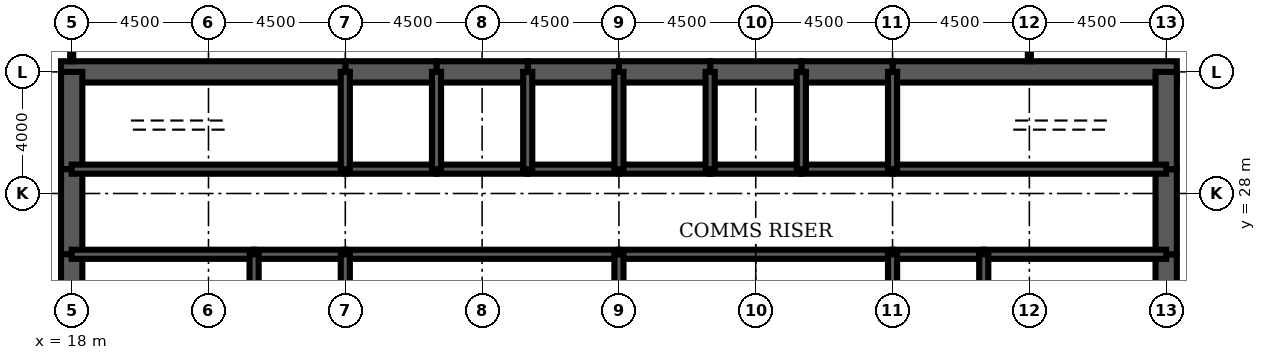
"""IFC4 building model, lengths in metres.
Left out: names, types, materials, properties, quantities, classifications, styles, units other than length and angle.
Written with IfcOpenShell. Run it as: python <this file> out.ifc"""

import sys

from ifc_helpers import new_model, si_unit, direction, frame, frame_2d, origin, place, context, subcontext, project, spatial, rectangle, extrude, element, fill, save


model = new_model("IFC4")
c1 = context("Model", 3, precision=1e-05, world=origin(), true_north=direction((0.0, 1.0)))
c2 = subcontext(c1, "Body", "Model", "MODEL_VIEW")
j1 = project(units=[si_unit("LENGTHUNIT", "METRE"), si_unit("PLANEANGLEUNIT", "RADIAN")], contexts=[c1])
p1 = place(None, origin())
s1 = spatial("IfcSite", under=j1, at=p1, CompositionType="ELEMENT")
p2 = place(p1, origin())
s2 = spatial("IfcBuilding", under=s1, at=p2, CompositionType="ELEMENT")
p3 = place(p2, frame((0.0, 0.0, 296.3)))
s3 = spatial("IfcBuildingStorey", under=s2, at=p3, CompositionType="ELEMENT", Elevation=296.3)
p4 = place(p3, frame((54.35, 32.0, 0.0), z_axis=(0.0, 0.0, 1.0), x_axis=(-1.0, 0.0, 0.0)))
e1 = element("IfcWall", 1, at=p4, inside=s3, PredefinedType="SHEAR", context=c2, shape_type="SweptSolid", body=[
    extrude(rectangle(XDim=9.35, YDim=0.7, at=frame_2d((4.675, 0.0))), origin(), (0.0, 0.0, 1.0), 4.2),
])
for number, where, z_axis, x_axis in (
    (2, (45.0, 32.0, 0.0), (0.0, 0.0, 1.0), (-1.0, 0.0, 0.0)),
    (3, (42.0, 32.0, 0.0), (0.0, 0.0, 1.0), (-1.0, 0.0, 0.0)),
    (4, (39.0, 32.0, 0.0), (0.0, 0.0, 1.0), (-1.0, 0.0, 0.0)),
    (5, (36.0, 32.0, 0.0), (0.0, 0.0, 1.0), (-1.0, 0.0, 0.0)),
    (6, (33.0, 32.0, 0.0), (0.0, 0.0, 1.0), (-1.0, 0.0, 0.0)),
    (7, (30.0, 32.0, 0.0), (0.0, 0.0, 1.0), (-1.0, 0.0, 0.0)),
):
    element("IfcWall", number, at=place(p3, frame(where, z_axis=z_axis, x_axis=x_axis)), inside=s3, PredefinedType="SHEAR", context=c2, shape_type="SweptSolid", body=[
        extrude(rectangle(XDim=3.0, YDim=0.7, at=frame_2d((1.5, 0.0))), origin(), (0.0, 0.0, 1.0), 4.2),
    ])
p5 = place(p3, frame((27.0, 32.0, 0.0), z_axis=(0.0, 0.0, 1.0), x_axis=(-1.0, 0.0, 0.0)))
e8 = element("IfcWall", 8, at=p5, inside=s3, PredefinedType="SHEAR", context=c2, shape_type="SweptSolid", body=[
    extrude(rectangle(XDim=9.35, YDim=0.7, at=frame_2d((4.675, 0.0))), origin(), (0.0, 0.0, 1.0), 4.2),
])
p6 = place(p3, frame((18.0, 32.0, 0.0), z_axis=(0.0, 0.0, 1.0), x_axis=(0.0, -1.0, 0.0)))
e9 = element("IfcWall", 9, at=p6, inside=s3, PredefinedType="SHEAR", context=c2, shape_type="SweptSolid", body=[
    extrude(rectangle(XDim=3.2, YDim=0.7, at=frame_2d((1.6, 0.0))), origin(), (0.0, 0.0, 1.0), 4.2),
])
p7 = place(p3, frame((18.0, 28.8, 0.0), z_axis=(0.0, 0.0, 1.0), x_axis=(0.0, -1.0, 0.0)))
e10 = element("IfcWall", 10, at=p7, inside=s3, PredefinedType="SHEAR", context=c2, shape_type="SweptSolid", body=[
    extrude(rectangle(XDim=2.8, YDim=0.7, at=frame_2d((1.4, 0.0))), origin(), (0.0, 0.0, 1.0), 4.2),
])
p8 = place(p7, frame((0.4, 0.0, 0.0)))
e11 = element("IfcOpeningElement", 11, at=p8, cuts=e10, PredefinedType="OPENING", context=c2, shape_type="SweptSolid", body=[
    extrude(rectangle(XDim=1.8, YDim=2.1, at=frame_2d((0.9, 1.05))), frame((0.0, 0.36, 0.0), z_axis=(0.0, -1.0, 0.0), x_axis=(1.0, 0.0, 0.0)), (0.0, 0.0, 1.0), 0.72),
])
for number, where, z_axis, x_axis in (
    (12, (18.0, 26.0, 0.0), (0.0, 0.0, 1.0), (0.0, -1.0, 0.0)),
    (13, (54.0, 22.0, 0.0), (0.0, 0.0, 1.0), (0.0, 1.0, 0.0)),
):
    element("IfcWall", number, at=place(p3, frame(where, z_axis=z_axis, x_axis=x_axis)), inside=s3, PredefinedType="SHEAR", context=c2, shape_type="SweptSolid", body=[
        extrude(rectangle(XDim=4.0, YDim=0.7, at=frame_2d((2.0, 0.0))), origin(), (0.0, 0.0, 1.0), 4.2),
    ])
p9 = place(p3, frame((54.0, 26.0, 0.0), z_axis=(0.0, 0.0, 1.0), x_axis=(0.0, 1.0, 0.0)))
e14 = element("IfcWall", 14, at=p9, inside=s3, PredefinedType="SHEAR", context=c2, shape_type="SweptSolid", body=[
    extrude(rectangle(XDim=2.8, YDim=0.7, at=frame_2d((1.4, 0.0))), origin(), (0.0, 0.0, 1.0), 4.2),
])
p10 = place(p9, frame((0.6, 0.0, 0.0)))
e15 = element("IfcOpeningElement", 15, at=p10, cuts=e14, PredefinedType="OPENING", context=c2, shape_type="SweptSolid", body=[
    extrude(rectangle(XDim=1.8, YDim=2.1, at=frame_2d((0.9, 1.05))), frame((0.0, 0.36, 0.0), z_axis=(0.0, -1.0, 0.0), x_axis=(1.0, 0.0, 0.0)), (0.0, 0.0, 1.0), 0.72),
])
p11 = place(p3, frame((54.0, 28.8, 0.0), z_axis=(0.0, 0.0, 1.0), x_axis=(0.0, 1.0, 0.0)))
e16 = element("IfcWall", 16, at=p11, inside=s3, PredefinedType="SHEAR", context=c2, shape_type="SweptSolid", body=[
    extrude(rectangle(XDim=3.2, YDim=0.7, at=frame_2d((1.6, 0.0))), origin(), (0.0, 0.0, 1.0), 4.2),
])
p12 = place(p3, frame((18.0, 28.8, 0.0), z_axis=(0.0, 0.0, 1.0), x_axis=(1.0, 0.0, 0.0)))
e17 = element("IfcWall", 17, at=p12, inside=s3, PredefinedType="SOLIDWALL", context=c2, shape_type="SweptSolid", body=[
    extrude(rectangle(XDim=9.0, YDim=0.3, at=frame_2d((4.5, 0.0))), origin(), (0.0, 0.0, 1.0), 4.2),
])
p13 = place(p12, frame((0.65, 0.0, 0.0)))
e18 = element("IfcOpeningElement", 18, at=p13, cuts=e17, PredefinedType="OPENING", context=c2, shape_type="SweptSolid", body=[
    extrude(rectangle(XDim=1.0, YDim=2.1, at=frame_2d((0.5, 1.05))), frame((0.0, 0.16, 0.0), z_axis=(0.0, -1.0, 0.0), x_axis=(1.0, 0.0, 0.0)), (0.0, 0.0, 1.0), 0.32),
])
p14 = place(p3, frame((27.0, 28.8, 0.0), z_axis=(0.0, 0.0, 1.0), x_axis=(1.0, 0.0, 0.0)))
e19 = element("IfcWall", 19, at=p14, inside=s3, PredefinedType="SOLIDWALL", context=c2, shape_type="SweptSolid", body=[
    extrude(rectangle(XDim=3.0, YDim=0.3, at=frame_2d((1.5, 0.0))), origin(), (0.0, 0.0, 1.0), 4.2),
])
p15 = place(p14, frame((0.95, 0.0, 0.0)))
e20 = element("IfcOpeningElement", 20, at=p15, cuts=e19, PredefinedType="OPENING", context=c2, shape_type="SweptSolid", body=[
    extrude(rectangle(XDim=1.1, YDim=2.2, at=frame_2d((0.55, 1.1))), frame((0.0, 0.16, 0.0), z_axis=(0.0, -1.0, 0.0), x_axis=(1.0, 0.0, 0.0)), (0.0, 0.0, 1.0), 0.32),
])
p16 = place(p3, frame((30.0, 28.8, 0.0), z_axis=(0.0, 0.0, 1.0), x_axis=(1.0, 0.0, 0.0)))
e21 = element("IfcWall", 21, at=p16, inside=s3, PredefinedType="SOLIDWALL", context=c2, shape_type="SweptSolid", body=[
    extrude(rectangle(XDim=3.0, YDim=0.3, at=frame_2d((1.5, 0.0))), origin(), (0.0, 0.0, 1.0), 4.2),
])
p17 = place(p16, frame((0.95, 0.0, 0.0)))
e22 = element("IfcOpeningElement", 22, at=p17, cuts=e21, PredefinedType="OPENING", context=c2, shape_type="SweptSolid", body=[
    extrude(rectangle(XDim=1.1, YDim=2.2, at=frame_2d((0.55, 1.1))), frame((0.0, 0.16, 0.0), z_axis=(0.0, -1.0, 0.0), x_axis=(1.0, 0.0, 0.0)), (0.0, 0.0, 1.0), 0.32),
])
p18 = place(p3, frame((33.0, 28.8, 0.0), z_axis=(0.0, 0.0, 1.0), x_axis=(1.0, 0.0, 0.0)))
e23 = element("IfcWall", 23, at=p18, inside=s3, PredefinedType="SOLIDWALL", context=c2, shape_type="SweptSolid", body=[
    extrude(rectangle(XDim=3.0, YDim=0.3, at=frame_2d((1.5, 0.0))), origin(), (0.0, 0.0, 1.0), 4.2),
])
p19 = place(p18, frame((0.95, 0.0, 0.0)))
e24 = element("IfcOpeningElement", 24, at=p19, cuts=e23, PredefinedType="OPENING", context=c2, shape_type="SweptSolid", body=[
    extrude(rectangle(XDim=1.1, YDim=2.2, at=frame_2d((0.55, 1.1))), frame((0.0, 0.16, 0.0), z_axis=(0.0, -1.0, 0.0), x_axis=(1.0, 0.0, 0.0)), (0.0, 0.0, 1.0), 0.32),
])
p20 = place(p3, frame((36.0, 28.8, 0.0), z_axis=(0.0, 0.0, 1.0), x_axis=(1.0, 0.0, 0.0)))
e25 = element("IfcWall", 25, at=p20, inside=s3, PredefinedType="SOLIDWALL", context=c2, shape_type="SweptSolid", body=[
    extrude(rectangle(XDim=3.0, YDim=0.3, at=frame_2d((1.5, 0.0))), origin(), (0.0, 0.0, 1.0), 4.2),
])
p21 = place(p20, frame((1.0, 0.0, 0.0)))
e26 = element("IfcOpeningElement", 26, at=p21, cuts=e25, PredefinedType="OPENING", context=c2, shape_type="SweptSolid", body=[
    extrude(rectangle(XDim=1.0, YDim=2.1, at=frame_2d((0.5, 1.05))), frame((0.0, 0.16, 0.0), z_axis=(0.0, -1.0, 0.0), x_axis=(1.0, 0.0, 0.0)), (0.0, 0.0, 1.0), 0.32),
])
p22 = place(p3, frame((39.0, 28.8, 0.0), z_axis=(0.0, 0.0, 1.0), x_axis=(1.0, 0.0, 0.0)))
e27 = element("IfcWall", 27, at=p22, inside=s3, PredefinedType="SOLIDWALL", context=c2, shape_type="SweptSolid", body=[
    extrude(rectangle(XDim=3.0, YDim=0.3, at=frame_2d((1.5, 0.0))), origin(), (0.0, 0.0, 1.0), 4.2),
])
p23 = place(p22, frame((1.0, 0.0, 0.0)))
e28 = element("IfcOpeningElement", 28, at=p23, cuts=e27, PredefinedType="OPENING", context=c2, shape_type="SweptSolid", body=[
    extrude(rectangle(XDim=1.0, YDim=2.1, at=frame_2d((0.5, 1.05))), frame((0.0, 0.16, 0.0), z_axis=(0.0, -1.0, 0.0), x_axis=(1.0, 0.0, 0.0)), (0.0, 0.0, 1.0), 0.32),
])
p24 = place(p3, frame((42.0, 28.8, 0.0), z_axis=(0.0, 0.0, 1.0), x_axis=(1.0, 0.0, 0.0)))
e29 = element("IfcWall", 29, at=p24, inside=s3, PredefinedType="SOLIDWALL", context=c2, shape_type="SweptSolid", body=[
    extrude(rectangle(XDim=3.0, YDim=0.3, at=frame_2d((1.5, 0.0))), origin(), (0.0, 0.0, 1.0), 4.2),
])
p25 = place(p24, frame((0.95, 0.0, 0.0)))
e30 = element("IfcOpeningElement", 30, at=p25, cuts=e29, PredefinedType="OPENING", context=c2, shape_type="SweptSolid", body=[
    extrude(rectangle(XDim=1.1, YDim=2.2, at=frame_2d((0.55, 1.1))), frame((0.0, 0.16, 0.0), z_axis=(0.0, -1.0, 0.0), x_axis=(1.0, 0.0, 0.0)), (0.0, 0.0, 1.0), 0.32),
])
p26 = place(p3, frame((45.0, 28.8, 0.0), z_axis=(0.0, 0.0, 1.0), x_axis=(1.0, 0.0, 0.0)))
e31 = element("IfcWall", 31, at=p26, inside=s3, PredefinedType="SOLIDWALL", context=c2, shape_type="SweptSolid", body=[
    extrude(rectangle(XDim=9.0, YDim=0.3, at=frame_2d((4.5, 0.0))), origin(), (0.0, 0.0, 1.0), 4.2),
])
p27 = place(p26, frame((7.35, 0.0, 0.0)))
e32 = element("IfcOpeningElement", 32, at=p27, cuts=e31, PredefinedType="OPENING", context=c2, shape_type="SweptSolid", body=[
    extrude(rectangle(XDim=1.0, YDim=2.1, at=frame_2d((0.5, 1.05))), frame((0.0, 0.16, 0.0), z_axis=(0.0, -1.0, 0.0), x_axis=(1.0, 0.0, 0.0)), (0.0, 0.0, 1.0), 0.32),
])
p28 = place(p3, frame((18.0, 26.0, 0.0), z_axis=(0.0, 0.0, 1.0), x_axis=(1.0, 0.0, 0.0)))
e33 = element("IfcWall", 33, at=p28, inside=s3, PredefinedType="SOLIDWALL", context=c2, shape_type="SweptSolid", body=[
    extrude(rectangle(XDim=6.0, YDim=0.3, at=frame_2d((3.0, 0.0))), origin(), (0.0, 0.0, 1.0), 4.2),
])
p29 = place(p3, frame((24.0, 26.0, 0.0), z_axis=(0.0, 0.0, 1.0), x_axis=(1.0, 0.0, 0.0)))
e34 = element("IfcWall", 34, at=p29, inside=s3, PredefinedType="SOLIDWALL", context=c2, shape_type="SweptSolid", body=[
    extrude(rectangle(XDim=3.0, YDim=0.3, at=frame_2d((1.5, 0.0))), origin(), (0.0, 0.0, 1.0), 4.2),
])
for number, where, z_axis, x_axis in (
    (35, (27.0, 26.0, 0.0), (0.0, 0.0, 1.0), (1.0, 0.0, 0.0)),
    (36, (36.0, 26.0, 0.0), (0.0, 0.0, 1.0), (1.0, 0.0, 0.0)),
):
    element("IfcWall", number, at=place(p3, frame(where, z_axis=z_axis, x_axis=x_axis)), inside=s3, PredefinedType="SOLIDWALL", context=c2, shape_type="SweptSolid", body=[
        extrude(rectangle(XDim=9.0, YDim=0.3, at=frame_2d((4.5, 0.0))), origin(), (0.0, 0.0, 1.0), 4.2),
    ])
p30 = place(p3, frame((45.0, 26.0, 0.0), z_axis=(0.0, 0.0, 1.0), x_axis=(1.0, 0.0, 0.0)))
e37 = element("IfcWall", 37, at=p30, inside=s3, PredefinedType="SOLIDWALL", context=c2, shape_type="SweptSolid", body=[
    extrude(rectangle(XDim=3.0, YDim=0.3, at=frame_2d((1.5, 0.0))), origin(), (0.0, 0.0, 1.0), 4.2),
])
p31 = place(p3, frame((48.0, 26.0, 0.0), z_axis=(0.0, 0.0, 1.0), x_axis=(1.0, 0.0, 0.0)))
e38 = element("IfcWall", 38, at=p31, inside=s3, PredefinedType="SOLIDWALL", context=c2, shape_type="SweptSolid", body=[
    extrude(rectangle(XDim=6.0, YDim=0.3, at=frame_2d((3.0, 0.0))), origin(), (0.0, 0.0, 1.0), 4.2),
])
for number, where, z_axis, x_axis in (
    (39, (27.0, 28.8, 0.0), (0.0, 0.0, 1.0), (0.0, 1.0, 0.0)),
    (40, (30.0, 28.8, 0.0), (0.0, 0.0, 1.0), (0.0, 1.0, 0.0)),
    (41, (33.0, 28.8, 0.0), (0.0, 0.0, 1.0), (0.0, 1.0, 0.0)),
    (42, (36.0, 28.8, 0.0), (0.0, 0.0, 1.0), (0.0, 1.0, 0.0)),
    (43, (39.0, 28.8, 0.0), (0.0, 0.0, 1.0), (0.0, 1.0, 0.0)),
    (44, (42.0, 28.8, 0.0), (0.0, 0.0, 1.0), (0.0, 1.0, 0.0)),
    (45, (45.0, 28.8, 0.0), (0.0, 0.0, 1.0), (0.0, 1.0, 0.0)),
):
    element("IfcWall", number, at=place(p3, frame(where, z_axis=z_axis, x_axis=x_axis)), inside=s3, PredefinedType="SOLIDWALL", context=c2, shape_type="SweptSolid", body=[
        extrude(rectangle(XDim=3.2, YDim=0.3, at=frame_2d((1.6, 0.0))), origin(), (0.0, 0.0, 1.0), 4.2),
    ])
for number, where, z_axis, x_axis in (
    (46, (24.0, 22.0, 0.0), (0.0, 0.0, 1.0), (0.0, 1.0, 0.0)),
    (47, (27.0, 22.0, 0.0), (0.0, 0.0, 1.0), (0.0, 1.0, 0.0)),
    (48, (36.0, 22.0, 0.0), (0.0, 0.0, 1.0), (0.0, 1.0, 0.0)),
    (49, (45.0, 22.0, 0.0), (0.0, 0.0, 1.0), (0.0, 1.0, 0.0)),
    (50, (48.0, 22.0, 0.0), (0.0, 0.0, 1.0), (0.0, 1.0, 0.0)),
):
    element("IfcWall", number, at=place(p3, frame(where, z_axis=z_axis, x_axis=x_axis)), inside=s3, PredefinedType="SOLIDWALL", context=c2, shape_type="SweptSolid", body=[
        extrude(rectangle(XDim=4.0, YDim=0.3, at=frame_2d((2.0, 0.0))), origin(), (0.0, 0.0, 1.0), 4.2),
    ])
p32 = place(p3, frame((38.5, 22.15, 0.0), z_axis=(0.0, 0.0, 1.0), x_axis=(0.0, 1.0, 0.0)))
e51 = element("IfcWall", 51, at=p32, inside=s3, PredefinedType="PARTITIONING", context=c2, shape_type="SweptSolid", body=[
    extrude(rectangle(XDim=3.7, YDim=0.15, at=frame_2d((1.85, 0.0))), origin(), (0.0, 0.0, 1.0), 3.0),
])
p33 = place(p32, frame((2.2, 0.0, 0.0)))
e52 = element("IfcOpeningElement", 52, at=p33, cuts=e51, PredefinedType="OPENING", context=c2, shape_type="SweptSolid", body=[
    extrude(rectangle(XDim=1.0, YDim=2.1, at=frame_2d((0.5, 1.05))), frame((0.0, 0.085, 0.0), z_axis=(0.0, -1.0, 0.0), x_axis=(1.0, 0.0, 0.0)), (0.0, 0.0, 1.0), 0.17),
])
for number, where, z_axis, x_axis in (
    (53, (19.925, 22.15, 0.0), (0.0, 0.0, 1.0), (0.0, 1.0, 0.0)),
    (54, (51.475, 22.15, 0.0), (0.0, 0.0, 1.0), (0.0, 1.0, 0.0)),
):
    element("IfcWall", number, at=place(p3, frame(where, z_axis=z_axis, x_axis=x_axis)), inside=s3, PredefinedType="PARTITIONING", context=c2, shape_type="SweptSolid", body=[
        extrude(rectangle(XDim=3.7, YDim=0.15, at=frame_2d((1.85, 0.0))), origin(), (0.0, 0.0, 1.0), 3.0),
    ])
p34 = place(p3, frame((23.7, 26.15, 0.0), z_axis=(0.0, 0.0, 1.0), x_axis=(0.0, 1.0, 0.0)))
e55 = element("IfcWall", 55, at=p34, inside=s3, PredefinedType="PARTITIONING", context=c2, shape_type="SweptSolid", body=[
    extrude(rectangle(XDim=2.5, YDim=0.15, at=frame_2d((1.25, 0.0))), origin(), (0.0, 0.0, 1.0), 3.0),
])
p35 = place(p34, frame((0.35, 0.0, 0.0)))
e56 = element("IfcOpeningElement", 56, at=p35, cuts=e55, PredefinedType="OPENING", context=c2, shape_type="SweptSolid", body=[
    extrude(rectangle(XDim=1.0, YDim=2.1, at=frame_2d((0.5, 1.05))), frame((0.0, 0.085, 0.0), z_axis=(0.0, -1.0, 0.0), x_axis=(1.0, 0.0, 0.0)), (0.0, 0.0, 1.0), 0.17),
])
p36 = place(p3, frame((18.0, 32.35, 0.0), z_axis=(0.0, 0.0, 1.0), x_axis=(0.0, 1.0, 0.0)))
e57 = element("IfcWall", 57, at=p36, inside=s3, PredefinedType="PARTITIONING", context=c2, shape_type="SweptSolid", body=[
    extrude(rectangle(XDim=4.2, YDim=0.1, at=frame_2d((2.1, 0.0))), origin(), (0.0, 0.0, 1.0), 3.0),
])
p37 = place(p36, frame((1.3, 0.0, 0.0)))
e58 = element("IfcOpeningElement", 58, at=p37, cuts=e57, PredefinedType="OPENING", context=c2, shape_type="SweptSolid", body=[
    extrude(rectangle(XDim=1.6, YDim=2.1, at=frame_2d((0.8, 1.05))), frame((0.0, 0.06, 0.0), z_axis=(0.0, -1.0, 0.0), x_axis=(1.0, 0.0, 0.0)), (0.0, 0.0, 1.0), 0.12),
])
p38 = place(p3, frame((49.5, 32.35, 0.0), z_axis=(0.0, 0.0, 1.0), x_axis=(0.0, 1.0, 0.0)))
e59 = element("IfcWall", 59, at=p38, inside=s3, PredefinedType="PARTITIONING", context=c2, shape_type="SweptSolid", body=[
    extrude(rectangle(XDim=5.2, YDim=0.1, at=frame_2d((2.6, 0.0))), origin(), (0.0, 0.0, 1.0), 3.0),
])
p39 = place(p38, frame((1.8, 0.0, 0.0)))
e60 = element("IfcOpeningElement", 60, at=p39, cuts=e59, PredefinedType="OPENING", context=c2, shape_type="SweptSolid", body=[
    extrude(rectangle(XDim=1.6, YDim=2.1, at=frame_2d((0.8, 1.05))), frame((0.0, 0.06, 0.0), z_axis=(0.0, -1.0, 0.0), x_axis=(1.0, 0.0, 0.0)), (0.0, 0.0, 1.0), 0.12),
])
p40 = place(p33, origin())
e61 = element("IfcDoor", 61, at=p40, inside=s3, OperationType="SINGLE_SWING_RIGHT", PredefinedType="DOOR", context=c2, shape_type="SweptSolid", body=[
    extrude(rectangle(XDim=1.0, YDim=2.1, at=frame_2d((0.5, 1.05))), frame((0.0, 0.025, 0.0), z_axis=(0.0, -1.0, 0.0), x_axis=(1.0, 0.0, 0.0)), (0.0, 0.0, 1.0), 0.05),
])
fill(e52, e61)
p41 = place(p35, origin())
e62 = element("IfcDoor", 62, at=p41, inside=s3, OperationType="SINGLE_SWING_LEFT", PredefinedType="DOOR", context=c2, shape_type="SweptSolid", body=[
    extrude(rectangle(XDim=1.0, YDim=2.1, at=frame_2d((0.5, 1.05))), frame((0.0, 0.025, 0.0), z_axis=(0.0, -1.0, 0.0), x_axis=(1.0, 0.0, 0.0)), (0.0, 0.0, 1.0), 0.05),
])
fill(e56, e62)
p42 = place(p25, origin())
e63 = element("IfcDoor", 63, at=p42, inside=s3, OperationType="DOUBLE_DOOR_SLIDING", PredefinedType="USERDEFINED", context=c2, shape_type="SweptSolid", body=[
    extrude(rectangle(XDim=1.1, YDim=2.2, at=frame_2d((0.55, 1.1))), frame((0.0, 0.025, 0.0), z_axis=(0.0, -1.0, 0.0), x_axis=(1.0, 0.0, 0.0)), (0.0, 0.0, 1.0), 0.05),
])
fill(e30, e63)
p43 = place(p15, origin())
e64 = element("IfcDoor", 64, at=p43, inside=s3, OperationType="DOUBLE_DOOR_SLIDING", PredefinedType="USERDEFINED", context=c2, shape_type="SweptSolid", body=[
    extrude(rectangle(XDim=1.1, YDim=2.2, at=frame_2d((0.55, 1.1))), frame((0.0, 0.025, 0.0), z_axis=(0.0, -1.0, 0.0), x_axis=(1.0, 0.0, 0.0)), (0.0, 0.0, 1.0), 0.05),
])
fill(e20, e64)
p44 = place(p17, origin())
e65 = element("IfcDoor", 65, at=p44, inside=s3, OperationType="DOUBLE_DOOR_SLIDING", PredefinedType="USERDEFINED", context=c2, shape_type="SweptSolid", body=[
    extrude(rectangle(XDim=1.1, YDim=2.2, at=frame_2d((0.55, 1.1))), frame((0.0, 0.025, 0.0), z_axis=(0.0, -1.0, 0.0), x_axis=(1.0, 0.0, 0.0)), (0.0, 0.0, 1.0), 0.05),
])
fill(e22, e65)
p45 = place(p19, origin())
e66 = element("IfcDoor", 66, at=p45, inside=s3, OperationType="DOUBLE_DOOR_SLIDING", PredefinedType="USERDEFINED", context=c2, shape_type="SweptSolid", body=[
    extrude(rectangle(XDim=1.1, YDim=2.2, at=frame_2d((0.55, 1.1))), frame((0.0, 0.025, 0.0), z_axis=(0.0, -1.0, 0.0), x_axis=(1.0, 0.0, 0.0)), (0.0, 0.0, 1.0), 0.05),
])
fill(e24, e66)
p46 = place(p13, origin())
e67 = element("IfcDoor", 67, at=p46, inside=s3, OperationType="SINGLE_SWING_LEFT", PredefinedType="DOOR", context=c2, shape_type="SweptSolid", body=[
    extrude(rectangle(XDim=1.0, YDim=2.1, at=frame_2d((0.5, 1.05))), frame((0.0, 0.025, 0.0), z_axis=(0.0, -1.0, 0.0), x_axis=(1.0, 0.0, 0.0)), (0.0, 0.0, 1.0), 0.05),
])
fill(e18, e67)
p47 = place(p27, origin())
e68 = element("IfcDoor", 68, at=p47, inside=s3, OperationType="SINGLE_SWING_RIGHT", PredefinedType="DOOR", context=c2, shape_type="SweptSolid", body=[
    extrude(rectangle(XDim=1.0, YDim=2.1, at=frame_2d((0.5, 1.05))), frame((0.0, 0.025, 0.0), z_axis=(0.0, -1.0, 0.0), x_axis=(1.0, 0.0, 0.0)), (0.0, 0.0, 1.0), 0.05),
])
fill(e32, e68)
p48 = place(p8, origin())
e69 = element("IfcDoor", 69, at=p48, inside=s3, OperationType="SINGLE_SWING_LEFT", PredefinedType="DOOR", context=c2, shape_type="SweptSolid", body=[
    extrude(rectangle(XDim=1.8, YDim=2.1, at=frame_2d((0.9, 1.05))), frame((0.0, 0.35, 0.0), z_axis=(0.0, -1.0, 0.0), x_axis=(1.0, 0.0, 0.0)), (0.0, 0.0, 1.0), 0.699),
])
fill(e11, e69)
p49 = place(p10, origin())
e70 = element("IfcDoor", 70, at=p49, inside=s3, OperationType="SINGLE_SWING_LEFT", PredefinedType="DOOR", context=c2, shape_type="SweptSolid", body=[
    extrude(rectangle(XDim=1.8, YDim=2.1, at=frame_2d((0.9, 1.05))), frame((0.0, 0.35, 0.0), z_axis=(0.0, -1.0, 0.0), x_axis=(1.0, 0.0, 0.0)), (0.0, 0.0, 1.0), 0.699),
])
fill(e15, e70)
p50 = place(p21, origin())
e71 = element("IfcDoor", 71, at=p50, inside=s3, OperationType="SINGLE_SWING_LEFT", PredefinedType="DOOR", context=c2, shape_type="SweptSolid", body=[
    extrude(rectangle(XDim=1.0, YDim=2.1, at=frame_2d((0.5, 1.05))), frame((0.0, 0.025, 0.0), z_axis=(0.0, -1.0, 0.0), x_axis=(1.0, 0.0, 0.0)), (0.0, 0.0, 1.0), 0.05),
])
fill(e26, e71)
p51 = place(p23, origin())
e72 = element("IfcDoor", 72, at=p51, inside=s3, OperationType="SINGLE_SWING_LEFT", PredefinedType="DOOR", context=c2, shape_type="SweptSolid", body=[
    extrude(rectangle(XDim=1.0, YDim=2.1, at=frame_2d((0.5, 1.05))), frame((0.0, 0.025, 0.0), z_axis=(0.0, -1.0, 0.0), x_axis=(1.0, 0.0, 0.0)), (0.0, 0.0, 1.0), 0.05),
])
fill(e28, e72)
save(model, sys.argv[1])
